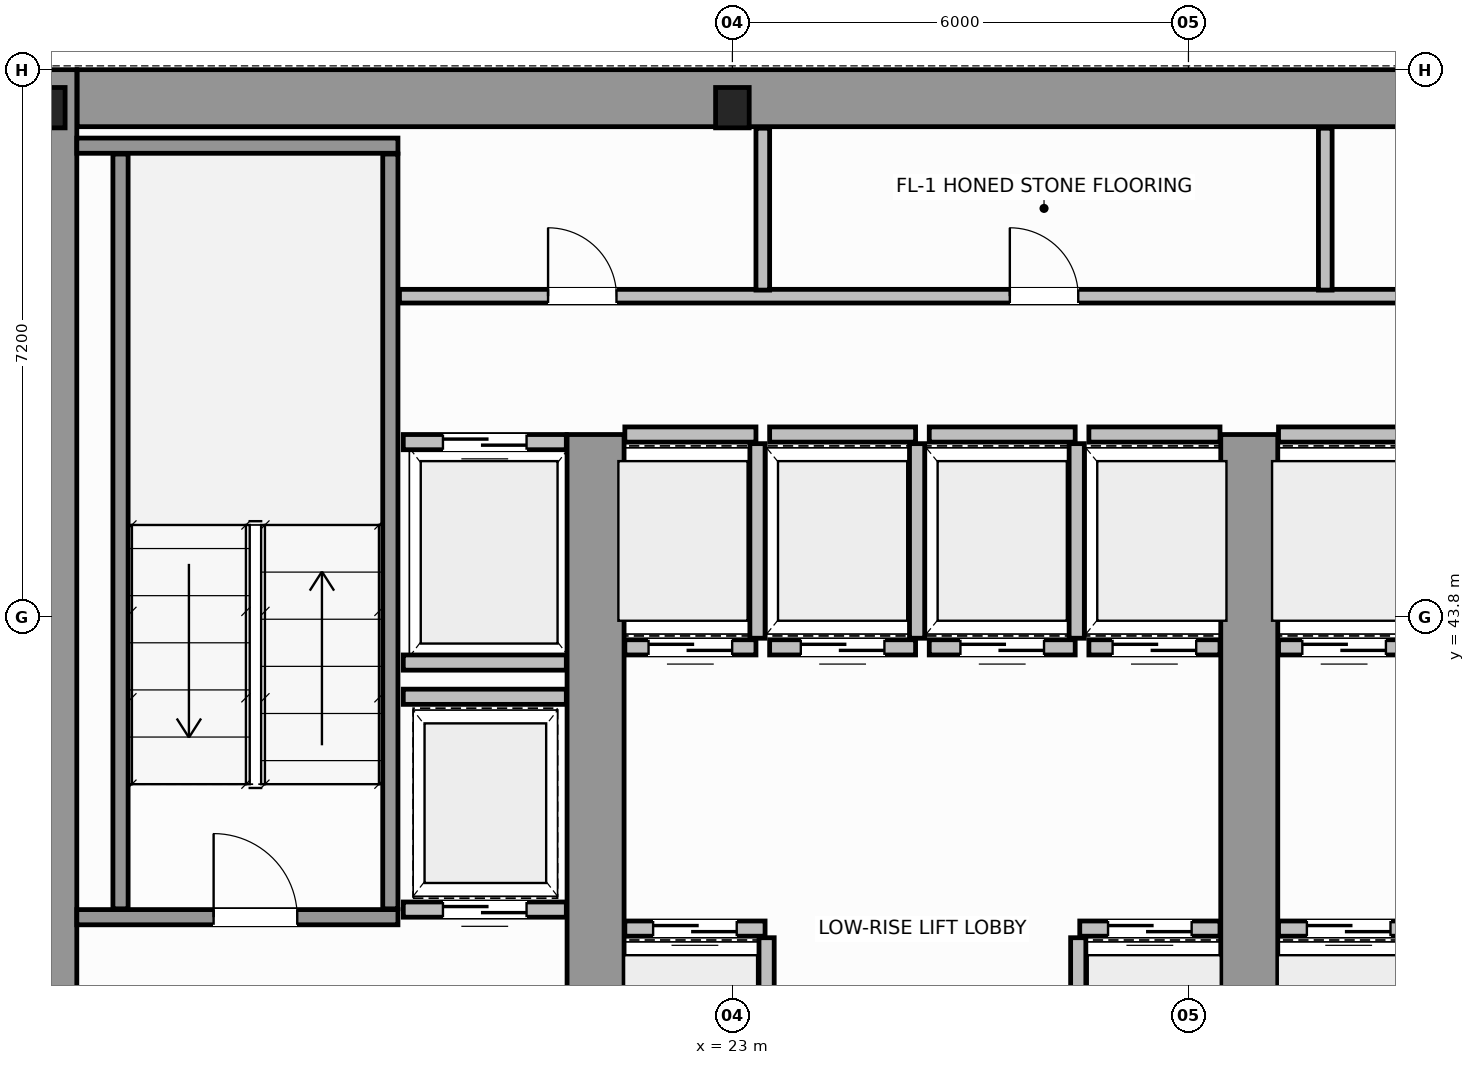
"""IFC4 building model, lengths in metres.
Left out: names, types, materials, properties, quantities, classifications, styles, units other than length and angle.
Written with IfcOpenShell. Run it as: python <this file> out.ifc"""

import sys

from ifc_helpers import new_model, si_unit, direction, frame, frame_2d, origin, origin_2d, place, context, subcontext, project, spatial, rectangle, i_section, extrude, source, transform, mapped, element, fill, save


model = new_model("IFC4")
c1 = context("Model", 3, precision=1e-05, world=origin(), true_north=direction((0.0, 1.0)))
c2 = subcontext(c1, "Body", "Model", "MODEL_VIEW")
j1 = project(units=[si_unit("LENGTHUNIT", "METRE"), si_unit("PLANEANGLEUNIT", "RADIAN")], contexts=[c1])
p1 = place(None, origin())
s1 = spatial("IfcSite", under=j1, at=p1, CompositionType="ELEMENT")
p2 = place(p1, origin())
s2 = spatial("IfcBuilding", under=s1, at=p2, CompositionType="ELEMENT")
p3 = place(p2, frame((0.0, 0.0, 99.6)))
s3 = spatial("IfcBuildingStorey", under=s2, at=p3, CompositionType="ELEMENT", Elevation=99.6)
m1 = source(origin(), c2, "Body", "SweptSolid", [
    extrude(i_section(OverallWidth=0.442, OverallDepth=0.531, WebThickness=0.065, FlangeThickness=0.076, FilletRadius=0.015, at=origin_2d()), origin(), (0.0, 0.0, 1.0), 3.8),
])
for number, where, z_axis, x_axis in (
    (1, (14.0, 50.5, 0.0), (0.0, 0.0, 1.0), (1.0, 0.0, 0.0)),
    (2, (23.0, 50.5, 0.0), (0.0, 0.0, 1.0), (1.0, 0.0, 0.0)),
):
    element("IfcColumn", number, at=place(p3, frame(where, z_axis=z_axis, x_axis=x_axis)), inside=s3, PredefinedType="COLUMN", context=c2, shape_type="MappedRepresentation", body=[
        mapped(m1, transform((0.0, 0.0, 0.0), scale=1.0)),
    ])
p4 = place(p3, frame((14.379, 50.625, 0.0), z_axis=(0.0, 0.0, 1.0), x_axis=(1.0, 0.0, 0.0)))
e3 = element("IfcWall", 3, at=p4, inside=s3, PredefinedType="SHEAR", context=c2, shape_type="SweptSolid", body=[
    extrude(rectangle(XDim=19.619, YDim=0.75, at=frame_2d((9.81, 0.0))), origin(), (0.0, 0.0, 1.0), 3.8),
])
p5 = place(p3, frame((14.0, 36.5, 0.0), z_axis=(0.0, 0.0, 1.0), x_axis=(0.0, 1.0, 0.0)))
e4 = element("IfcWall", 4, at=p5, inside=s3, PredefinedType="SHEAR", context=c2, shape_type="SweptSolid", body=[
    extrude(rectangle(XDim=14.5, YDim=0.75, at=frame_2d((7.25, 0.0))), origin(), (0.0, 0.0, 1.0), 3.8),
])
for number, where, z_axis, x_axis in (
    (5, (21.2, 36.895, 0.0), (0.0, 0.0, 1.0), (0.0, 1.0, 0.0)),
    (6, (29.8, 36.895, 0.0), (0.0, 0.0, 1.0), (0.0, 1.0, 0.0)),
):
    element("IfcWall", number, at=place(p3, frame(where, z_axis=z_axis, x_axis=x_axis)), inside=s3, PredefinedType="SHEAR", context=c2, shape_type="SweptSolid", body=[
        extrude(rectangle(XDim=9.305, YDim=0.75, at=frame_2d((4.652, 0.0))), origin(), (0.0, 0.0, 1.0), 3.8),
    ])
p6 = place(p3, frame((14.375, 39.85, 0.0), z_axis=(0.0, 0.0, 1.0), x_axis=(1.0, 0.0, 0.0)))
e7 = element("IfcWall", 7, at=p6, inside=s3, PredefinedType="SOLIDWALL", context=c2, shape_type="SweptSolid", body=[
    extrude(rectangle(XDim=4.225, YDim=0.2, at=frame_2d((2.113, 0.0))), origin(), (0.0, 0.0, 1.0), 3.8),
])
p7 = place(p6, frame((1.8, 0.0, 0.0)))
e8 = element("IfcOpeningElement", 8, at=p7, cuts=e7, PredefinedType="OPENING", context=c2, shape_type="SweptSolid", body=[
    extrude(rectangle(XDim=1.1, YDim=2.15, at=frame_2d((0.55, 1.075))), frame((0.0, 0.11, 0.0), z_axis=(0.0, -1.0, 0.0), x_axis=(1.0, 0.0, 0.0)), (0.0, 0.0, 1.0), 0.22),
])
p8 = place(p3, frame((14.375, 50.0, 0.0), z_axis=(0.0, 0.0, 1.0), x_axis=(1.0, 0.0, 0.0)))
e9 = element("IfcWall", 9, at=p8, inside=s3, PredefinedType="SOLIDWALL", context=c2, shape_type="SweptSolid", body=[
    extrude(rectangle(XDim=4.225, YDim=0.2, at=frame_2d((2.113, 0.0))), origin(), (0.0, 0.0, 1.0), 3.8),
])
for number, where, z_axis, x_axis in (
    (10, (14.95, 39.96, 0.0), (0.0, 0.0, 1.0), (0.0, 1.0, 0.0)),
    (11, (18.5, 39.96, 0.0), (0.0, 0.0, 1.0), (0.0, 1.0, 0.0)),
):
    element("IfcWall", number, at=place(p3, frame(where, z_axis=z_axis, x_axis=x_axis)), inside=s3, PredefinedType="SOLIDWALL", context=c2, shape_type="SweptSolid", body=[
        extrude(rectangle(XDim=9.93, YDim=0.2, at=frame_2d((4.965, 0.0))), origin(), (0.0, 0.0, 1.0), 3.8),
    ])
p9 = place(p3, frame((21.585, 39.7, 0.0), z_axis=(0.0, 0.0, 1.0), x_axis=(1.0, 0.0, 0.0)))
e12 = element("IfcWall", 12, at=p9, inside=s3, PredefinedType="SOLIDWALL", context=c2, shape_type="SweptSolid", body=[
    extrude(rectangle(XDim=1.845, YDim=0.2, at=frame_2d((0.922, 0.0))), origin(), (0.0, 0.0, 1.0), 3.58),
])
p10 = place(p9, frame((0.372, 0.0, 0.0)))
e13 = element("IfcOpeningElement", 13, at=p10, cuts=e12, PredefinedType="OPENING", context=c2, shape_type="SweptSolid", body=[
    extrude(rectangle(XDim=1.1, YDim=2.15, at=frame_2d((0.55, 1.075))), frame((0.0, 0.11, 0.0), z_axis=(0.0, -1.0, 0.0), x_axis=(1.0, 0.0, 0.0)), (0.0, 0.0, 1.0), 0.22),
])
p11 = place(p3, frame((23.45, 37.02, 0.0), z_axis=(0.0, 0.0, 1.0), x_axis=(0.0, 1.0, 0.0)))
e14 = element("IfcWall", 14, at=p11, inside=s3, PredefinedType="SOLIDWALL", context=c2, shape_type="SweptSolid", body=[
    extrude(rectangle(XDim=2.56, YDim=0.2, at=frame_2d((1.28, 0.0))), origin(), (0.0, 0.0, 1.0), 3.58),
])
p12 = place(p3, frame((27.57, 39.7, 0.0), z_axis=(0.0, 0.0, 1.0), x_axis=(1.0, 0.0, 0.0)))
e15 = element("IfcWall", 15, at=p12, inside=s3, PredefinedType="SOLIDWALL", context=c2, shape_type="SweptSolid", body=[
    extrude(rectangle(XDim=1.845, YDim=0.2, at=frame_2d((0.922, 0.0))), origin(), (0.0, 0.0, 1.0), 3.58),
])
p13 = place(p12, frame((0.372, 0.0, 0.0)))
e16 = element("IfcOpeningElement", 16, at=p13, cuts=e15, PredefinedType="OPENING", context=c2, shape_type="SweptSolid", body=[
    extrude(rectangle(XDim=1.1, YDim=2.15, at=frame_2d((0.55, 1.075))), frame((0.0, 0.11, 0.0), z_axis=(0.0, -1.0, 0.0), x_axis=(1.0, 0.0, 0.0)), (0.0, 0.0, 1.0), 0.22),
])
p14 = place(p3, frame((27.55, 37.02, 0.0), z_axis=(0.0, 0.0, 1.0), x_axis=(0.0, 1.0, 0.0)))
e17 = element("IfcWall", 17, at=p14, inside=s3, PredefinedType="SOLIDWALL", context=c2, shape_type="SweptSolid", body=[
    extrude(rectangle(XDim=2.56, YDim=0.2, at=frame_2d((1.28, 0.0))), origin(), (0.0, 0.0, 1.0), 3.58),
])
p15 = place(p3, frame((21.585, 43.4, 0.0), z_axis=(0.0, 0.0, 1.0), x_axis=(1.0, 0.0, 0.0)))
e18 = element("IfcWall", 18, at=p15, inside=s3, PredefinedType="SOLIDWALL", context=c2, shape_type="SweptSolid", body=[
    extrude(rectangle(XDim=1.725, YDim=0.2, at=frame_2d((0.863, 0.0))), origin(), (0.0, 0.0, 1.0), 3.58),
])
p16 = place(p15, frame((0.312, 0.0, 0.0)))
e19 = element("IfcOpeningElement", 19, at=p16, cuts=e18, PredefinedType="OPENING", context=c2, shape_type="SweptSolid", body=[
    extrude(rectangle(XDim=1.1, YDim=2.15, at=frame_2d((0.55, 1.075))), frame((0.0, 0.11, 0.0), z_axis=(0.0, -1.0, 0.0), x_axis=(1.0, 0.0, 0.0)), (0.0, 0.0, 1.0), 0.22),
])
p17 = place(p3, frame((21.585, 46.2, 0.0), z_axis=(0.0, 0.0, 1.0), x_axis=(1.0, 0.0, 0.0)))
e20 = element("IfcWall", 20, at=p17, inside=s3, PredefinedType="SOLIDWALL", context=c2, shape_type="SweptSolid", body=[
    extrude(rectangle(XDim=1.725, YDim=0.2, at=frame_2d((0.863, 0.0))), origin(), (0.0, 0.0, 1.0), 3.58),
])
p18 = place(p3, frame((23.33, 43.52, 0.0), z_axis=(0.0, 0.0, 1.0), x_axis=(0.0, 1.0, 0.0)))
e21 = element("IfcWall", 21, at=p18, inside=s3, PredefinedType="SOLIDWALL", context=c2, shape_type="SweptSolid", body=[
    extrude(rectangle(XDim=2.56, YDim=0.2, at=frame_2d((1.28, 0.0))), origin(), (0.0, 0.0, 1.0), 3.58),
])
p19 = place(p3, frame((23.49, 43.4, 0.0), z_axis=(0.0, 0.0, 1.0), x_axis=(1.0, 0.0, 0.0)))
e22 = element("IfcWall", 22, at=p19, inside=s3, PredefinedType="SOLIDWALL", context=c2, shape_type="SweptSolid", body=[
    extrude(rectangle(XDim=1.92, YDim=0.2, at=frame_2d((0.96, 0.0))), origin(), (0.0, 0.0, 1.0), 3.58),
])
p20 = place(p19, frame((0.41, 0.0, 0.0)))
e23 = element("IfcOpeningElement", 23, at=p20, cuts=e22, PredefinedType="OPENING", context=c2, shape_type="SweptSolid", body=[
    extrude(rectangle(XDim=1.1, YDim=2.15, at=frame_2d((0.55, 1.075))), frame((0.0, 0.11, 0.0), z_axis=(0.0, -1.0, 0.0), x_axis=(1.0, 0.0, 0.0)), (0.0, 0.0, 1.0), 0.22),
])
p21 = place(p3, frame((23.49, 46.2, 0.0), z_axis=(0.0, 0.0, 1.0), x_axis=(1.0, 0.0, 0.0)))
e24 = element("IfcWall", 24, at=p21, inside=s3, PredefinedType="SOLIDWALL", context=c2, shape_type="SweptSolid", body=[
    extrude(rectangle(XDim=1.92, YDim=0.2, at=frame_2d((0.96, 0.0))), origin(), (0.0, 0.0, 1.0), 3.58),
])
p22 = place(p3, frame((25.43, 43.52, 0.0), z_axis=(0.0, 0.0, 1.0), x_axis=(0.0, 1.0, 0.0)))
e25 = element("IfcWall", 25, at=p22, inside=s3, PredefinedType="SOLIDWALL", context=c2, shape_type="SweptSolid", body=[
    extrude(rectangle(XDim=2.56, YDim=0.2, at=frame_2d((1.28, 0.0))), origin(), (0.0, 0.0, 1.0), 3.58),
])
p23 = place(p3, frame((25.59, 43.4, 0.0), z_axis=(0.0, 0.0, 1.0), x_axis=(1.0, 0.0, 0.0)))
e26 = element("IfcWall", 26, at=p23, inside=s3, PredefinedType="SOLIDWALL", context=c2, shape_type="SweptSolid", body=[
    extrude(rectangle(XDim=1.92, YDim=0.2, at=frame_2d((0.96, 0.0))), origin(), (0.0, 0.0, 1.0), 3.58),
])
p24 = place(p23, frame((0.41, 0.0, 0.0)))
e27 = element("IfcOpeningElement", 27, at=p24, cuts=e26, PredefinedType="OPENING", context=c2, shape_type="SweptSolid", body=[
    extrude(rectangle(XDim=1.1, YDim=2.15, at=frame_2d((0.55, 1.075))), frame((0.0, 0.11, 0.0), z_axis=(0.0, -1.0, 0.0), x_axis=(1.0, 0.0, 0.0)), (0.0, 0.0, 1.0), 0.22),
])
p25 = place(p3, frame((25.59, 46.2, 0.0), z_axis=(0.0, 0.0, 1.0), x_axis=(1.0, 0.0, 0.0)))
e28 = element("IfcWall", 28, at=p25, inside=s3, PredefinedType="SOLIDWALL", context=c2, shape_type="SweptSolid", body=[
    extrude(rectangle(XDim=1.92, YDim=0.2, at=frame_2d((0.96, 0.0))), origin(), (0.0, 0.0, 1.0), 3.58),
])
p26 = place(p3, frame((27.53, 43.52, 0.0), z_axis=(0.0, 0.0, 1.0), x_axis=(0.0, 1.0, 0.0)))
e29 = element("IfcWall", 29, at=p26, inside=s3, PredefinedType="SOLIDWALL", context=c2, shape_type="SweptSolid", body=[
    extrude(rectangle(XDim=2.56, YDim=0.2, at=frame_2d((1.28, 0.0))), origin(), (0.0, 0.0, 1.0), 3.58),
])
p27 = place(p3, frame((27.69, 43.4, 0.0), z_axis=(0.0, 0.0, 1.0), x_axis=(1.0, 0.0, 0.0)))
e30 = element("IfcWall", 30, at=p27, inside=s3, PredefinedType="SOLIDWALL", context=c2, shape_type="SweptSolid", body=[
    extrude(rectangle(XDim=1.725, YDim=0.2, at=frame_2d((0.863, 0.0))), origin(), (0.0, 0.0, 1.0), 3.58),
])
p28 = place(p27, frame((0.312, 0.0, 0.0)))
e31 = element("IfcOpeningElement", 31, at=p28, cuts=e30, PredefinedType="OPENING", context=c2, shape_type="SweptSolid", body=[
    extrude(rectangle(XDim=1.1, YDim=2.15, at=frame_2d((0.55, 1.075))), frame((0.0, 0.11, 0.0), z_axis=(0.0, -1.0, 0.0), x_axis=(1.0, 0.0, 0.0)), (0.0, 0.0, 1.0), 0.22),
])
p29 = place(p3, frame((27.69, 46.2, 0.0), z_axis=(0.0, 0.0, 1.0), x_axis=(1.0, 0.0, 0.0)))
e32 = element("IfcWall", 32, at=p29, inside=s3, PredefinedType="SOLIDWALL", context=c2, shape_type="SweptSolid", body=[
    extrude(rectangle(XDim=1.725, YDim=0.2, at=frame_2d((0.863, 0.0))), origin(), (0.0, 0.0, 1.0), 3.58),
])
p30 = place(p3, frame((30.185, 39.7, 0.0), z_axis=(0.0, 0.0, 1.0), x_axis=(1.0, 0.0, 0.0)))
e33 = element("IfcWall", 33, at=p30, inside=s3, PredefinedType="SOLIDWALL", context=c2, shape_type="SweptSolid", body=[
    extrude(rectangle(XDim=1.845, YDim=0.2, at=frame_2d((0.922, 0.0))), origin(), (0.0, 0.0, 1.0), 3.58),
])
p31 = place(p30, frame((0.373, 0.0, 0.0)))
e34 = element("IfcOpeningElement", 34, at=p31, cuts=e33, PredefinedType="OPENING", context=c2, shape_type="SweptSolid", body=[
    extrude(rectangle(XDim=1.1, YDim=2.15, at=frame_2d((0.55, 1.075))), frame((0.0, 0.11, 0.0), z_axis=(0.0, -1.0, 0.0), x_axis=(1.0, 0.0, 0.0)), (0.0, 0.0, 1.0), 0.22),
])
p32 = place(p3, frame((30.185, 43.4, 0.0), z_axis=(0.0, 0.0, 1.0), x_axis=(1.0, 0.0, 0.0)))
e35 = element("IfcWall", 35, at=p32, inside=s3, PredefinedType="SOLIDWALL", context=c2, shape_type="SweptSolid", body=[
    extrude(rectangle(XDim=1.725, YDim=0.2, at=frame_2d((0.862, 0.0))), origin(), (0.0, 0.0, 1.0), 3.58),
])
p33 = place(p32, frame((0.313, 0.0, 0.0)))
e36 = element("IfcOpeningElement", 36, at=p33, cuts=e35, PredefinedType="OPENING", context=c2, shape_type="SweptSolid", body=[
    extrude(rectangle(XDim=1.1, YDim=2.15, at=frame_2d((0.55, 1.075))), frame((0.0, 0.11, 0.0), z_axis=(0.0, -1.0, 0.0), x_axis=(1.0, 0.0, 0.0)), (0.0, 0.0, 1.0), 0.22),
])
p34 = place(p3, frame((30.185, 46.2, 0.0), z_axis=(0.0, 0.0, 1.0), x_axis=(1.0, 0.0, 0.0)))
e37 = element("IfcWall", 37, at=p34, inside=s3, PredefinedType="SOLIDWALL", context=c2, shape_type="SweptSolid", body=[
    extrude(rectangle(XDim=1.725, YDim=0.2, at=frame_2d((0.862, 0.0))), origin(), (0.0, 0.0, 1.0), 3.58),
])
p35 = place(p3, frame((18.67, 46.1, 0.0), z_axis=(0.0, 0.0, 1.0), x_axis=(1.0, 0.0, 0.0)))
e38 = element("IfcWall", 38, at=p35, inside=s3, PredefinedType="SOLIDWALL", context=c2, shape_type="SweptSolid", body=[
    extrude(rectangle(XDim=2.145, YDim=0.2, at=frame_2d((1.073, 0.0))), origin(), (0.0, 0.0, 1.0), 3.58),
])
p36 = place(p35, frame((0.522, 0.0, 0.0)))
e39 = element("IfcOpeningElement", 39, at=p36, cuts=e38, PredefinedType="OPENING", context=c2, shape_type="SweptSolid", body=[
    extrude(rectangle(XDim=1.1, YDim=2.15, at=frame_2d((0.55, 1.075))), frame((0.0, 0.11, 0.0), z_axis=(0.0, -1.0, 0.0), x_axis=(1.0, 0.0, 0.0)), (0.0, 0.0, 1.0), 0.22),
])
p37 = place(p3, frame((18.67, 43.2, 0.0), z_axis=(0.0, 0.0, 1.0), x_axis=(1.0, 0.0, 0.0)))
e40 = element("IfcWall", 40, at=p37, inside=s3, PredefinedType="SOLIDWALL", context=c2, shape_type="SweptSolid", body=[
    extrude(rectangle(XDim=2.145, YDim=0.2, at=frame_2d((1.073, 0.0))), origin(), (0.0, 0.0, 1.0), 3.58),
])
p38 = place(p3, frame((18.67, 39.95, 0.0), z_axis=(0.0, 0.0, 1.0), x_axis=(1.0, 0.0, 0.0)))
e41 = element("IfcWall", 41, at=p38, inside=s3, PredefinedType="SOLIDWALL", context=c2, shape_type="SweptSolid", body=[
    extrude(rectangle(XDim=2.145, YDim=0.2, at=frame_2d((1.073, 0.0))), origin(), (0.0, 0.0, 1.0), 3.58),
])
p39 = place(p38, frame((0.522, 0.0, 0.0)))
e42 = element("IfcOpeningElement", 42, at=p39, cuts=e41, PredefinedType="OPENING", context=c2, shape_type="SweptSolid", body=[
    extrude(rectangle(XDim=1.1, YDim=2.15, at=frame_2d((0.55, 1.075))), frame((0.0, 0.11, 0.0), z_axis=(0.0, -1.0, 0.0), x_axis=(1.0, 0.0, 0.0)), (0.0, 0.0, 1.0), 0.22),
])
p40 = place(p3, frame((18.67, 42.75, 0.0), z_axis=(0.0, 0.0, 1.0), x_axis=(1.0, 0.0, 0.0)))
e43 = element("IfcWall", 43, at=p40, inside=s3, PredefinedType="SOLIDWALL", context=c2, shape_type="SweptSolid", body=[
    extrude(rectangle(XDim=2.145, YDim=0.2, at=frame_2d((1.073, 0.0))), origin(), (0.0, 0.0, 1.0), 3.58),
])
p41 = place(p3, frame((18.62, 48.02, 0.0), z_axis=(0.0, 0.0, 1.0), x_axis=(1.0, 0.0, 0.0)))
e44 = element("IfcWall", 44, at=p41, inside=s3, PredefinedType="PLUMBINGWALL", context=c2, shape_type="SweptSolid", body=[
    extrude(rectangle(XDim=30.76, YDim=0.18, at=frame_2d((15.38, 0.0))), origin(), (0.0, 0.0, 1.0), 3.58),
])
p42 = place(p41, frame((1.955, 0.0, 0.0)))
e45 = element("IfcOpeningElement", 45, at=p42, cuts=e44, PredefinedType="OPENING", context=c2, shape_type="SweptSolid", body=[
    extrude(rectangle(XDim=0.9, YDim=2.15, at=frame_2d((0.45, 1.075))), frame((0.0, 0.1, 0.0), z_axis=(0.0, -1.0, 0.0), x_axis=(1.0, 0.0, 0.0)), (0.0, 0.0, 1.0), 0.2),
])
p43 = place(p41, frame((8.03, 0.0, 0.0)))
e46 = element("IfcOpeningElement", 46, at=p43, cuts=e44, PredefinedType="OPENING", context=c2, shape_type="SweptSolid", body=[
    extrude(rectangle(XDim=0.9, YDim=2.15, at=frame_2d((0.45, 1.075))), frame((0.0, 0.1, 0.0), z_axis=(0.0, -1.0, 0.0), x_axis=(1.0, 0.0, 0.0)), (0.0, 0.0, 1.0), 0.2),
])
p44 = place(p41, frame((16.93, 0.0, 0.0)))
e47 = element("IfcOpeningElement", 47, at=p44, cuts=e44, PredefinedType="OPENING", context=c2, shape_type="SweptSolid", body=[
    extrude(rectangle(XDim=0.9, YDim=2.15, at=frame_2d((0.45, 1.075))), frame((0.0, 0.1, 0.0), z_axis=(0.0, -1.0, 0.0), x_axis=(1.0, 0.0, 0.0)), (0.0, 0.0, 1.0), 0.2),
])
p45 = place(p41, frame((26.205, 0.0, 0.0)))
e48 = element("IfcOpeningElement", 48, at=p45, cuts=e44, PredefinedType="OPENING", context=c2, shape_type="SweptSolid", body=[
    extrude(rectangle(XDim=0.9, YDim=2.15, at=frame_2d((0.45, 1.075))), frame((0.0, 0.1, 0.0), z_axis=(0.0, -1.0, 0.0), x_axis=(1.0, 0.0, 0.0)), (0.0, 0.0, 1.0), 0.2),
])
for number, where, z_axis, x_axis in (
    (49, (23.4, 48.1, 0.0), (0.0, 0.0, 1.0), (0.0, 1.0, 0.0)),
    (50, (30.8, 48.1, 0.0), (0.0, 0.0, 1.0), (0.0, 1.0, 0.0)),
):
    element("IfcWall", number, at=place(p3, frame(where, z_axis=z_axis, x_axis=x_axis)), inside=s3, PredefinedType="PLUMBINGWALL", context=c2, shape_type="SweptSolid", body=[
        extrude(rectangle(XDim=2.13, YDim=0.18, at=frame_2d((1.065, 0.0))), origin(), (0.0, 0.0, 1.0), 3.58),
    ])
m2 = source(origin(), c2, "Body", "SweptSolid", [
    extrude(rectangle(XDim=1.1, YDim=2.15, at=frame_2d((0.55, 1.075))), frame((0.0, 0.025, 0.0), z_axis=(0.0, -1.0, 0.0), x_axis=(1.0, 0.0, 0.0)), (0.0, 0.0, 1.0), 0.05),
])
p46 = place(p7, origin())
e51 = element("IfcDoor", 51, at=p46, inside=s3, OperationType="SINGLE_SWING_LEFT", PredefinedType="DOOR", context=c2, shape_type="MappedRepresentation", body=[
    mapped(m2, transform((0.0, 0.0, 0.0), scale=1.0)),
])
fill(e8, e51)
p47 = place(p10, origin())
e52 = element("IfcDoor", 52, at=p47, inside=s3, OperationType="DOUBLE_DOOR_SLIDING", PredefinedType="DOOR", context=c2, shape_type="MappedRepresentation", body=[
    mapped(m2, transform((0.0, 0.0, 0.0), scale=1.0)),
])
fill(e13, e52)
p48 = place(p13, origin())
e53 = element("IfcDoor", 53, at=p48, inside=s3, OperationType="DOUBLE_DOOR_SLIDING", PredefinedType="DOOR", context=c2, shape_type="MappedRepresentation", body=[
    mapped(m2, transform((0.0, 0.0, 0.0), scale=1.0)),
])
fill(e16, e53)
p49 = place(p16, origin())
e54 = element("IfcDoor", 54, at=p49, inside=s3, OperationType="DOUBLE_DOOR_SLIDING", PredefinedType="DOOR", context=c2, shape_type="MappedRepresentation", body=[
    mapped(m2, transform((0.0, 0.0, 0.0), scale=1.0)),
])
fill(e19, e54)
p50 = place(p20, origin())
e55 = element("IfcDoor", 55, at=p50, inside=s3, OperationType="DOUBLE_DOOR_SLIDING", PredefinedType="DOOR", context=c2, shape_type="MappedRepresentation", body=[
    mapped(m2, transform((0.0, 0.0, 0.0), scale=1.0)),
])
fill(e23, e55)
p51 = place(p24, origin())
e56 = element("IfcDoor", 56, at=p51, inside=s3, OperationType="DOUBLE_DOOR_SLIDING", PredefinedType="DOOR", context=c2, shape_type="MappedRepresentation", body=[
    mapped(m2, transform((0.0, 0.0, 0.0), scale=1.0)),
])
fill(e27, e56)
p52 = place(p28, origin())
e57 = element("IfcDoor", 57, at=p52, inside=s3, OperationType="DOUBLE_DOOR_SLIDING", PredefinedType="DOOR", context=c2, shape_type="MappedRepresentation", body=[
    mapped(m2, transform((0.0, 0.0, 0.0), scale=1.0)),
])
fill(e31, e57)
p53 = place(p31, origin())
e58 = element("IfcDoor", 58, at=p53, inside=s3, OperationType="DOUBLE_DOOR_SLIDING", PredefinedType="DOOR", context=c2, shape_type="MappedRepresentation", body=[
    mapped(m2, transform((0.0, 0.0, 0.0), scale=1.0)),
])
fill(e34, e58)
p54 = place(p33, origin())
e59 = element("IfcDoor", 59, at=p54, inside=s3, OperationType="DOUBLE_DOOR_SLIDING", PredefinedType="DOOR", context=c2, shape_type="MappedRepresentation", body=[
    mapped(m2, transform((0.0, 0.0, 0.0), scale=1.0)),
])
fill(e36, e59)
p55 = place(p36, origin())
e60 = element("IfcDoor", 60, at=p55, inside=s3, OperationType="DOUBLE_DOOR_SLIDING", PredefinedType="DOOR", context=c2, shape_type="MappedRepresentation", body=[
    mapped(m2, transform((0.0, 0.0, 0.0), scale=1.0)),
])
fill(e39, e60)
p56 = place(p39, origin())
e61 = element("IfcDoor", 61, at=p56, inside=s3, OperationType="DOUBLE_DOOR_SLIDING", PredefinedType="DOOR", context=c2, shape_type="MappedRepresentation", body=[
    mapped(m2, transform((0.0, 0.0, 0.0), scale=1.0)),
])
fill(e42, e61)
m3 = source(origin(), c2, "Body", "SweptSolid", [
    extrude(rectangle(XDim=0.9, YDim=2.15, at=frame_2d((0.45, 1.075))), frame((0.0, 0.025, 0.0), z_axis=(0.0, -1.0, 0.0), x_axis=(1.0, 0.0, 0.0)), (0.0, 0.0, 1.0), 0.05),
])
p57 = place(p42, origin())
e62 = element("IfcDoor", 62, at=p57, inside=s3, OperationType="SINGLE_SWING_LEFT", PredefinedType="DOOR", context=c2, shape_type="MappedRepresentation", body=[
    mapped(m3, transform((0.0, 0.0, 0.0), scale=1.0)),
])
fill(e45, e62)
p58 = place(p43, origin())
e63 = element("IfcDoor", 63, at=p58, inside=s3, OperationType="SINGLE_SWING_RIGHT", PredefinedType="DOOR", context=c2, shape_type="MappedRepresentation", body=[
    mapped(m3, transform((0.0, 0.0, 0.0), scale=1.0)),
])
fill(e46, e63)
save(model, sys.argv[1])
